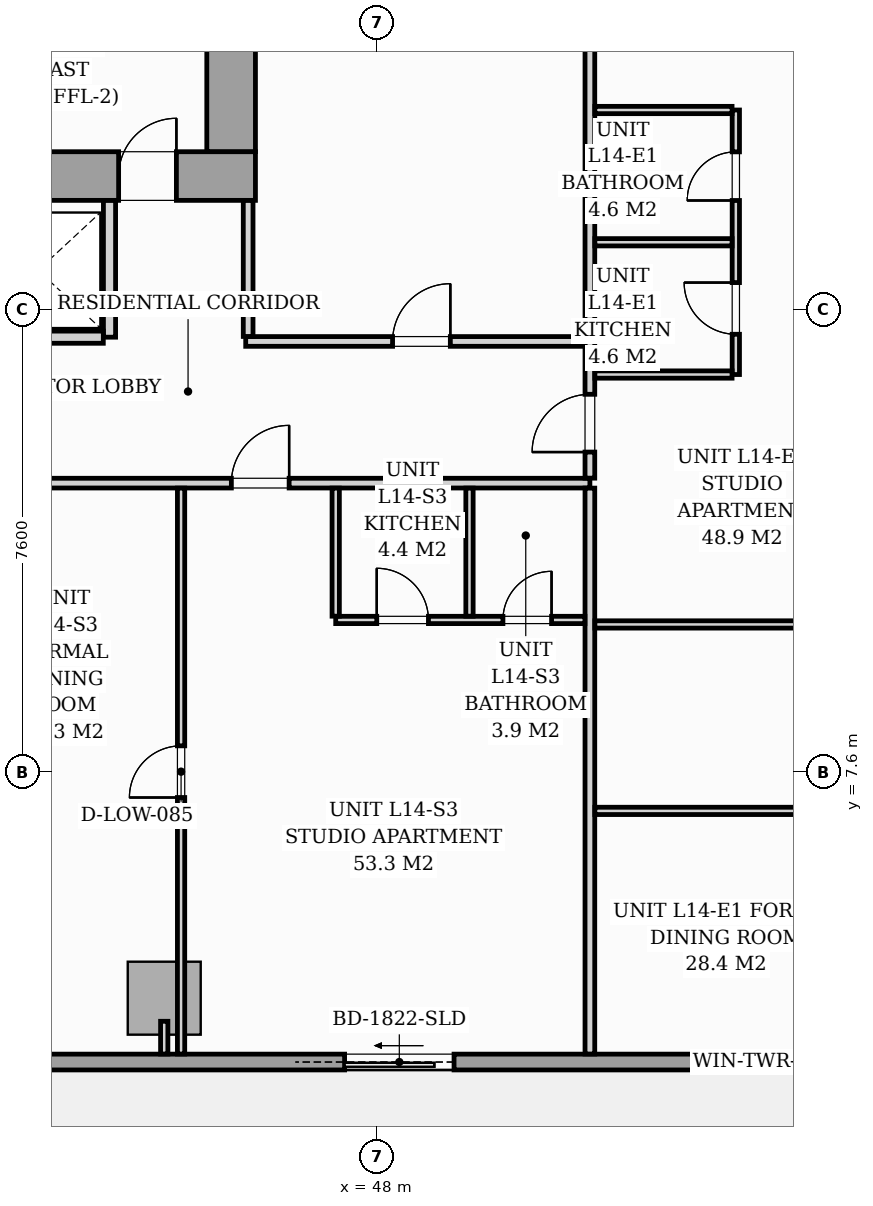
"""IFC4 building model, lengths in metres.
Left out: names, types, materials, properties, quantities, classifications, styles, units other than length and angle.
Written with IfcOpenShell. Run it as: python <this file> out.ifc"""

import sys

from ifc_helpers import new_model, si_unit, direction, frame, frame_2d, origin, origin_2d, place, context, subcontext, project, spatial, rectangle, i_section, extrude, source, transform, mapped, element, fill, save


model = new_model("IFC4")
c1 = context("Model", 3, precision=1e-05, world=origin(), true_north=direction((0.0, 1.0)))
c2 = subcontext(c1, "Body", "Model", "MODEL_VIEW")
j1 = project(units=[si_unit("LENGTHUNIT", "METRE"), si_unit("PLANEANGLEUNIT", "RADIAN")], contexts=[c1])
p1 = place(None, origin())
s1 = spatial("IfcSite", under=j1, at=p1, CompositionType="ELEMENT")
p2 = place(p1, origin())
s2 = spatial("IfcBuilding", under=s1, at=p2, CompositionType="ELEMENT")
p3 = place(p2, frame((0.0, 0.0, 51.8)))
s3 = spatial("IfcBuildingStorey", under=s2, at=p3, CompositionType="ELEMENT", Elevation=51.8)
m1 = source(origin(), c2, "Body", "SweptSolid", [
    extrude(i_section(OverallWidth=0.437, OverallDepth=0.514, WebThickness=0.061, FlangeThickness=0.097, FilletRadius=0.018, at=origin_2d()), origin(), (0.0, 0.0, 1.0), 3.196),
])
p4 = place(p3, frame((45.6, 17.4, 0.002), z_axis=(0.0, 0.0, 1.0), x_axis=(1.0, 0.0, 0.0)))
e1 = element("IfcColumn", 1, at=p4, inside=s3, PredefinedType="PILASTER", context=c2, shape_type="MappedRepresentation", body=[
    mapped(m1, transform((0.0, 0.0, 0.0), scale=1.0)),
])
m2 = source(origin(), c2, "Body", "SweptSolid", [
    extrude(rectangle(XDim=1.2, YDim=1.2, at=origin_2d()), origin(), (0.0, 0.0, 1.0), 3.196),
])
p5 = place(p3, frame((44.5, 3.88, 0.002), z_axis=(0.0, 0.0, 1.0), x_axis=(1.0, 0.0, 0.0)))
e2 = element("IfcColumn", 2, at=p5, inside=s3, PredefinedType="COLUMN", context=c2, shape_type="MappedRepresentation", body=[
    mapped(m2, transform((0.0, 0.0, 0.0), scale=1.0)),
])
p6 = place(p3, frame((57.3, 2.83, 0.0), z_axis=(0.0, 0.0, 1.0), x_axis=(-1.0, 0.0, 0.0)))
e3 = element("IfcWall", 3, at=p6, inside=s3, PredefinedType="STANDARD", context=c2, shape_type="SweptSolid", body=[
    extrude(rectangle(XDim=17.15, YDim=0.26, at=frame_2d((8.575, 0.0))), origin(), (0.0, 0.0, 1.0), 2.94),
])
p7 = place(p6, frame((8.034, 0.0, 0.0)))
e4 = element("IfcOpeningElement", 4, at=p7, cuts=e3, PredefinedType="OPENING", context=c2, shape_type="SweptSolid", body=[
    extrude(rectangle(XDim=1.8, YDim=2.06, at=frame_2d((0.9, 1.03))), frame((0.0, 0.14, 0.0), z_axis=(0.0, -1.0, 0.0), x_axis=(1.0, 0.0, 0.0)), (0.0, 0.0, 1.0), 0.28),
])
p8 = place(p6, frame((2.05, 0.0, 0.65)))
e5 = element("IfcOpeningElement", 5, at=p8, cuts=e3, PredefinedType="OPENING", context=c2, shape_type="SweptSolid", body=[
    extrude(rectangle(XDim=1.6, YDim=1.5, at=frame_2d((0.8, 0.75))), frame((0.0, 0.14, 0.0), z_axis=(0.0, -1.0, 0.0), x_axis=(1.0, 0.0, 0.0)), (0.0, 0.0, 1.0), 0.28),
])
p9 = place(p3, frame((26.0, 17.4, 0.0), z_axis=(0.0, 0.0, 1.0), x_axis=(1.0, 0.0, 0.0)))
e6 = element("IfcWall", 6, at=p9, inside=s3, PredefinedType="SHEAR", context=c2, shape_type="SweptSolid", body=[
    extrude(rectangle(XDim=20.0, YDim=0.8, at=frame_2d((10.0, 0.0))), origin(), (0.0, 0.0, 1.0), 3.2),
])
p10 = place(p9, frame((1.15, 0.0, 0.0)))
e7 = element("IfcOpeningElement", 7, at=p10, cuts=e6, PredefinedType="OPENING", context=c2, shape_type="SweptSolid", body=[
    extrude(rectangle(XDim=0.95, YDim=2.06, at=frame_2d((0.475, 1.03))), frame((0.0, 0.41, 0.0), z_axis=(0.0, -1.0, 0.0), x_axis=(1.0, 0.0, 0.0)), (0.0, 0.0, 1.0), 0.82),
])
p11 = place(p9, frame((9.58, 0.0, 0.0)))
e8 = element("IfcOpeningElement", 8, at=p11, cuts=e6, PredefinedType="OPENING", context=c2, shape_type="SweptSolid", body=[
    extrude(rectangle(XDim=0.85, YDim=2.0, at=frame_2d((0.425, 1.0))), frame((0.0, 0.41, 0.0), z_axis=(0.0, -1.0, 0.0), x_axis=(1.0, 0.0, 0.0)), (0.0, 0.0, 1.0), 0.82),
])
p12 = place(p9, frame((17.75, 0.0, 0.0)))
e9 = element("IfcOpeningElement", 9, at=p12, cuts=e6, PredefinedType="OPENING", context=c2, shape_type="SweptSolid", body=[
    extrude(rectangle(XDim=0.95, YDim=2.06, at=frame_2d((0.475, 1.03))), frame((0.0, 0.41, 0.0), z_axis=(0.0, -1.0, 0.0), x_axis=(1.0, 0.0, 0.0)), (0.0, 0.0, 1.0), 0.82),
])
p13 = place(p3, frame((45.6, 17.802, 0.0), z_axis=(0.0, 0.0, 1.0), x_axis=(0.0, 1.0, 0.0)))
e10 = element("IfcWall", 10, at=p13, inside=s3, PredefinedType="SHEAR", context=c2, shape_type="SweptSolid", body=[
    extrude(rectangle(XDim=5.796, YDim=0.8, at=frame_2d((2.898, 0.0))), origin(), (0.0, 0.0, 1.0), 3.2),
])
p14 = place(p3, frame((43.6, 14.75, 0.0), z_axis=(0.0, 0.0, 1.0), x_axis=(0.0, 1.0, 0.0)))
e11 = element("IfcWall", 11, at=p14, inside=s3, PredefinedType="PARTITIONING", context=c2, shape_type="SweptSolid", body=[
    extrude(rectangle(XDim=2.248, YDim=0.2, at=frame_2d((1.124, 0.0))), origin(), (0.0, 0.0, 1.0), 2.94),
])
p15 = place(p3, frame((41.352, 14.75, 0.0), z_axis=(0.0, 0.0, 1.0), x_axis=(1.0, 0.0, 0.0)))
e12 = element("IfcWall", 12, at=p15, inside=s3, PredefinedType="PARTITIONING", context=c2, shape_type="SweptSolid", body=[
    extrude(rectangle(XDim=2.146, YDim=0.2, at=frame_2d((1.073, 0.0))), origin(), (0.0, 0.0, 1.0), 2.94),
])
p16 = place(p3, frame((16.3, 12.35, 0.0), z_axis=(0.0, 0.0, 1.0), x_axis=(1.0, 0.0, 0.0)))
e13 = element("IfcWall", 13, at=p16, inside=s3, PredefinedType="PARTITIONING", context=c2, shape_type="SweptSolid", body=[
    extrude(rectangle(XDim=35.2, YDim=0.16, at=frame_2d((17.6, 0.0))), origin(), (0.0, 0.0, 1.0), 2.94),
])
p17 = place(p16, frame((6.307, 0.0, 0.0)))
e14 = element("IfcOpeningElement", 14, at=p17, cuts=e13, PredefinedType="OPENING", context=c2, shape_type="SweptSolid", body=[
    extrude(rectangle(XDim=0.95, YDim=2.06, at=frame_2d((0.475, 1.03))), frame((0.0, 0.09, 0.0), z_axis=(0.0, -1.0, 0.0), x_axis=(1.0, 0.0, 0.0)), (0.0, 0.0, 1.0), 0.18),
])
p18 = place(p16, frame((18.392, 0.0, 0.0)))
e15 = element("IfcOpeningElement", 15, at=p18, cuts=e13, PredefinedType="OPENING", context=c2, shape_type="SweptSolid", body=[
    extrude(rectangle(XDim=0.95, YDim=2.06, at=frame_2d((0.475, 1.03))), frame((0.0, 0.09, 0.0), z_axis=(0.0, -1.0, 0.0), x_axis=(1.0, 0.0, 0.0)), (0.0, 0.0, 1.0), 0.18),
])
p19 = place(p16, frame((29.304, 0.0, 0.0)))
e16 = element("IfcOpeningElement", 16, at=p19, cuts=e13, PredefinedType="OPENING", context=c2, shape_type="SweptSolid", body=[
    extrude(rectangle(XDim=0.95, YDim=2.06, at=frame_2d((0.475, 1.03))), frame((0.0, 0.09, 0.0), z_axis=(0.0, -1.0, 0.0), x_axis=(1.0, 0.0, 0.0)), (0.0, 0.0, 1.0), 0.18),
])
p20 = place(p3, frame((51.5, 2.962, 0.0), z_axis=(0.0, 0.0, 1.0), x_axis=(0.0, 1.0, 0.0)))
e17 = element("IfcWall", 17, at=p20, inside=s3, PredefinedType="PARTITIONING", context=c2, shape_type="SweptSolid", body=[
    extrude(rectangle(XDim=9.306, YDim=0.16, at=frame_2d((4.653, 0.0))), origin(), (0.0, 0.0, 1.0), 2.94),
])
p21 = place(p3, frame((51.5, 12.432, 0.0), z_axis=(0.0, 0.0, 1.0), x_axis=(0.0, 1.0, 0.0)))
e18 = element("IfcWall", 18, at=p21, inside=s3, PredefinedType="PARTITIONING", context=c2, shape_type="SweptSolid", body=[
    extrude(rectangle(XDim=15.006, YDim=0.16, at=frame_2d((7.503, 0.0))), origin(), (0.0, 0.0, 1.0), 2.94),
])
p22 = place(p21, frame((0.429, 0.0, 0.0)))
e19 = element("IfcOpeningElement", 19, at=p22, cuts=e18, PredefinedType="OPENING", context=c2, shape_type="SweptSolid", body=[
    extrude(rectangle(XDim=0.95, YDim=2.06, at=frame_2d((0.475, 1.03))), frame((0.0, 0.09, 0.0), z_axis=(0.0, -1.0, 0.0), x_axis=(1.0, 0.0, 0.0)), (0.0, 0.0, 1.0), 0.18),
])
p23 = place(p3, frame((47.32, 10.1, 0.0), z_axis=(0.0, 0.0, 1.0), x_axis=(1.0, 0.0, 0.0)))
e20 = element("IfcWall", 20, at=p23, inside=s3, PredefinedType="PARTITIONING", context=c2, shape_type="SweptSolid", body=[
    extrude(rectangle(XDim=4.098, YDim=0.12, at=frame_2d((2.049, 0.0))), origin(), (0.0, 0.0, 1.0), 2.94),
])
p24 = place(p23, frame((0.675, 0.0, 0.0)))
e21 = element("IfcOpeningElement", 21, at=p24, cuts=e20, PredefinedType="OPENING", context=c2, shape_type="SweptSolid", body=[
    extrude(rectangle(XDim=0.85, YDim=2.05, at=frame_2d((0.425, 1.025))), frame((0.0, 0.07, 0.0), z_axis=(0.0, -1.0, 0.0), x_axis=(1.0, 0.0, 0.0)), (0.0, 0.0, 1.0), 0.14),
])
p25 = place(p23, frame((2.75, 0.0, 0.0)))
e22 = element("IfcOpeningElement", 22, at=p25, cuts=e20, PredefinedType="OPENING", context=c2, shape_type="SweptSolid", body=[
    extrude(rectangle(XDim=0.8, YDim=2.02, at=frame_2d((0.4, 1.01))), frame((0.0, 0.07, 0.0), z_axis=(0.0, -1.0, 0.0), x_axis=(1.0, 0.0, 0.0)), (0.0, 0.0, 1.0), 0.14),
])
for number, where, z_axis, x_axis in (
    (23, (47.32, 10.162, 0.0), (0.0, 0.0, 1.0), (0.0, 1.0, 0.0)),
    (24, (49.52, 10.162, 0.0), (0.0, 0.0, 1.0), (0.0, 1.0, 0.0)),
):
    element("IfcWall", number, at=place(p3, frame(where, z_axis=z_axis, x_axis=x_axis)), inside=s3, PredefinedType="PARTITIONING", context=c2, shape_type="SweptSolid", body=[
        extrude(rectangle(XDim=2.106, YDim=0.12, at=frame_2d((1.053, 0.0))), origin(), (0.0, 0.0, 1.0), 2.94),
    ])
p26 = place(p3, frame((44.777, 2.962, 0.0), z_axis=(0.0, 0.0, 1.0), x_axis=(0.0, 1.0, 0.0)))
e25 = element("IfcWall", 25, at=p26, inside=s3, PredefinedType="PARTITIONING", context=c2, shape_type="SweptSolid", body=[
    extrude(rectangle(XDim=9.306, YDim=0.12, at=frame_2d((4.653, 0.0))), origin(), (0.0, 0.0, 1.0), 2.136),
])
p27 = place(p26, frame((4.218, 0.0, 0.0)))
e26 = element("IfcOpeningElement", 26, at=p27, cuts=e25, PredefinedType="OPENING", context=c2, shape_type="SweptSolid", body=[
    extrude(rectangle(XDim=0.85, YDim=2.01, at=frame_2d((0.425, 1.005))), frame((0.0, 0.07, 0.0), z_axis=(0.0, -1.0, 0.0), x_axis=(1.0, 0.0, 0.0)), (0.0, 0.0, 1.0), 0.14),
])
p28 = place(p3, frame((53.9, 14.136, 0.0), z_axis=(0.0, 0.0, 1.0), x_axis=(0.0, 1.0, 0.0)))
e27 = element("IfcWall", 27, at=p28, inside=s3, PredefinedType="PARTITIONING", context=c2, shape_type="SweptSolid", body=[
    extrude(rectangle(XDim=4.35, YDim=0.12, at=frame_2d((2.175, 0.0))), origin(), (0.0, 0.0, 1.0), 2.94),
])
p29 = place(p28, frame((0.662, 0.0, 0.0)))
e28 = element("IfcOpeningElement", 28, at=p29, cuts=e27, PredefinedType="OPENING", context=c2, shape_type="SweptSolid", body=[
    extrude(rectangle(XDim=0.85, YDim=2.05, at=frame_2d((0.425, 1.025))), frame((0.0, 0.07, 0.0), z_axis=(0.0, -1.0, 0.0), x_axis=(1.0, 0.0, 0.0)), (0.0, 0.0, 1.0), 0.14),
])
p30 = place(p28, frame((2.862, 0.0, 0.0)))
e29 = element("IfcOpeningElement", 29, at=p30, cuts=e27, PredefinedType="OPENING", context=c2, shape_type="SweptSolid", body=[
    extrude(rectangle(XDim=0.8, YDim=2.02, at=frame_2d((0.4, 1.01))), frame((0.0, 0.07, 0.0), z_axis=(0.0, -1.0, 0.0), x_axis=(1.0, 0.0, 0.0)), (0.0, 0.0, 1.0), 0.14),
])
p31 = place(p3, frame((51.582, 16.311, 0.0), z_axis=(0.0, 0.0, 1.0), x_axis=(1.0, 0.0, 0.0)))
e30 = element("IfcWall", 30, at=p31, inside=s3, PredefinedType="PARTITIONING", context=c2, shape_type="SweptSolid", body=[
    extrude(rectangle(XDim=2.256, YDim=0.12, at=frame_2d((1.128, 0.0))), origin(), (0.0, 0.0, 1.0), 2.045),
])
for number, where, z_axis, x_axis in (
    (31, (51.582, 14.136, 0.0), (0.0, 0.0, 1.0), (1.0, 0.0, 0.0)),
    (32, (51.582, 18.486, 0.0), (0.0, 0.0, 1.0), (1.0, 0.0, 0.0)),
):
    element("IfcWall", number, at=place(p3, frame(where, z_axis=z_axis, x_axis=x_axis)), inside=s3, PredefinedType="PARTITIONING", context=c2, shape_type="SweptSolid", body=[
        extrude(rectangle(XDim=2.256, YDim=0.12, at=frame_2d((1.128, 0.0))), origin(), (0.0, 0.0, 1.0), 2.94),
    ])
p32 = place(p3, frame((51.582, 6.96, 0.0), z_axis=(0.0, 0.0, 1.0), x_axis=(1.0, 0.0, 0.0)))
e33 = element("IfcWall", 33, at=p32, inside=s3, PredefinedType="PARTITIONING", context=c2, shape_type="SweptSolid", body=[
    extrude(rectangle(XDim=8.138, YDim=0.12, at=frame_2d((4.069, 0.0))), origin(), (0.0, 0.0, 1.0), 2.94),
])
p33 = place(p32, frame((3.653, 0.0, 0.0)))
e34 = element("IfcOpeningElement", 34, at=p33, cuts=e33, PredefinedType="OPENING", context=c2, shape_type="SweptSolid", body=[
    extrude(rectangle(XDim=0.85, YDim=2.05, at=frame_2d((0.425, 1.025))), frame((0.0, 0.07, 0.0), z_axis=(0.0, -1.0, 0.0), x_axis=(1.0, 0.0, 0.0)), (0.0, 0.0, 1.0), 0.14),
])
p34 = place(p3, frame((51.582, 10.026, 0.0), z_axis=(0.0, 0.0, 1.0), x_axis=(1.0, 0.0, 0.0)))
e35 = element("IfcWall", 35, at=p34, inside=s3, PredefinedType="PARTITIONING", context=c2, shape_type="SweptSolid", body=[
    extrude(rectangle(XDim=8.138, YDim=0.12, at=frame_2d((4.069, 0.0))), origin(), (0.0, 0.0, 1.0), 2.94),
])
p35 = place(p34, frame((3.653, 0.0, 0.0)))
e36 = element("IfcOpeningElement", 36, at=p35, cuts=e35, PredefinedType="OPENING", context=c2, shape_type="SweptSolid", body=[
    extrude(rectangle(XDim=0.85, YDim=2.05, at=frame_2d((0.425, 1.025))), frame((0.0, 0.07, 0.0), z_axis=(0.0, -1.0, 0.0), x_axis=(1.0, 0.0, 0.0)), (0.0, 0.0, 1.0), 0.14),
])
p36 = place(p3, frame((45.84, 14.68, 0.0), z_axis=(0.0, 0.0, 1.0), x_axis=(1.0, 0.0, 0.0)))
e37 = element("IfcWall", 37, at=p36, inside=s3, PredefinedType="PARTITIONING", context=c2, shape_type="SweptSolid", body=[
    extrude(rectangle(XDim=5.578, YDim=0.16, at=frame_2d((2.789, 0.0))), origin(), (0.0, 0.0, 1.0), 2.94),
])
p37 = place(p36, frame((2.415, 0.0, 0.0)))
e38 = element("IfcOpeningElement", 38, at=p37, cuts=e37, PredefinedType="OPENING", context=c2, shape_type="SweptSolid", body=[
    extrude(rectangle(XDim=0.95, YDim=2.06, at=frame_2d((0.475, 1.03))), frame((0.0, 0.09, 0.0), z_axis=(0.0, -1.0, 0.0), x_axis=(1.0, 0.0, 0.0)), (0.0, 0.0, 1.0), 0.18),
])
p38 = place(p3, frame((45.88, 14.762, 0.0), z_axis=(0.0, 0.0, 1.0), x_axis=(0.0, 1.0, 0.0)))
e39 = element("IfcWall", 39, at=p38, inside=s3, PredefinedType="PARTITIONING", context=c2, shape_type="SweptSolid", body=[
    extrude(rectangle(XDim=2.236, YDim=0.16, at=frame_2d((1.118, 0.0))), origin(), (0.0, 0.0, 1.0), 2.94),
])
p39 = place(p3, frame((44.5, 3.5, 0.0), z_axis=(0.0, 0.0, 1.0), x_axis=(0.0, -1.0, 0.0)))
e40 = element("IfcWall", 40, at=p39, inside=s3, PredefinedType="PARTITIONING", context=c2, shape_type="SweptSolid", body=[
    extrude(rectangle(XDim=0.538, YDim=0.12, at=frame_2d((0.269, 0.0))), origin(), (0.0, 0.0, 1.0), 2.94),
])
m3 = source(origin(), c2, "Body", "SweptSolid", [
    extrude(rectangle(XDim=1.8, YDim=2.06, at=frame_2d((0.9, 1.03))), frame((0.0, 0.025, 0.0), z_axis=(0.0, -1.0, 0.0), x_axis=(1.0, 0.0, 0.0)), (0.0, 0.0, 1.0), 0.05),
])
p40 = place(p7, origin())
e41 = element("IfcDoor", 41, at=p40, inside=s3, OperationType="SLIDING_TO_RIGHT", PredefinedType="DOOR", context=c2, shape_type="MappedRepresentation", body=[
    mapped(m3, transform((0.0, 0.0, 0.0), scale=1.0)),
])
fill(e4, e41)
m4 = source(origin(), c2, "Body", "SweptSolid", [
    extrude(rectangle(XDim=1.6, YDim=1.5, at=frame_2d((0.8, 0.75))), frame((0.0, 0.03, 0.0), z_axis=(0.0, -1.0, 0.0), x_axis=(1.0, 0.0, 0.0)), (0.0, 0.0, 1.0), 0.06),
])
p41 = place(p8, origin())
e42 = element("IfcWindow", 42, at=p41, inside=s3, PartitioningType="SINGLE_PANEL", PredefinedType="WINDOW", context=c2, shape_type="MappedRepresentation", body=[
    mapped(m4, transform((0.0, 0.0, 0.0), scale=1.0)),
])
fill(e5, e42)
m5 = source(origin(), c2, "Body", "SweptSolid", [
    extrude(rectangle(XDim=0.95, YDim=2.06, at=frame_2d((0.475, 1.03))), frame((0.0, 0.025, 0.0), z_axis=(0.0, -1.0, 0.0), x_axis=(1.0, 0.0, 0.0)), (0.0, 0.0, 1.0), 0.05),
])
p42 = place(p12, origin())
e43 = element("IfcDoor", 43, at=p42, inside=s3, OperationType="SINGLE_SWING_RIGHT", PredefinedType="DOOR", context=c2, shape_type="MappedRepresentation", body=[
    mapped(m5, transform((0.0, 0.0, 0.0), scale=1.0)),
])
fill(e9, e43)
m6 = source(origin(), c2, "Body", "SweptSolid", [
    extrude(rectangle(XDim=0.85, YDim=2.01, at=frame_2d((0.425, 1.005))), frame((0.0, 0.025, 0.0), z_axis=(0.0, -1.0, 0.0), x_axis=(1.0, 0.0, 0.0)), (0.0, 0.0, 1.0), 0.05),
])
p43 = place(p27, origin())
e44 = element("IfcDoor", 44, at=p43, inside=s3, OperationType="SINGLE_SWING_LEFT", PredefinedType="DOOR", context=c2, shape_type="MappedRepresentation", body=[
    mapped(m6, transform((0.0, 0.0, 0.0), scale=1.0)),
])
fill(e26, e44)
m7 = source(origin(), c2, "Body", "SweptSolid", [
    extrude(rectangle(XDim=0.95, YDim=2.06, at=frame_2d((0.475, 1.03))), frame((0.0, 0.025, 0.0), z_axis=(0.0, -1.0, 0.0), x_axis=(1.0, 0.0, 0.0)), (0.0, 0.0, 1.0), 0.05),
])
p44 = place(p19, origin())
e45 = element("IfcDoor", 45, at=p44, inside=s3, OperationType="SINGLE_SWING_RIGHT", PredefinedType="DOOR", context=c2, shape_type="MappedRepresentation", body=[
    mapped(m7, transform((0.0, 0.0, 0.0), scale=1.0)),
])
fill(e16, e45)
m8 = source(origin(), c2, "Body", "SweptSolid", [
    extrude(rectangle(XDim=0.85, YDim=2.05, at=frame_2d((0.425, 1.025))), frame((0.0, 0.025, 0.0), z_axis=(0.0, -1.0, 0.0), x_axis=(1.0, 0.0, 0.0)), (0.0, 0.0, 1.0), 0.05),
])
p45 = place(p24, origin())
e46 = element("IfcDoor", 46, at=p45, inside=s3, OperationType="SINGLE_SWING_LEFT", PredefinedType="DOOR", context=c2, shape_type="MappedRepresentation", body=[
    mapped(m8, transform((0.0, 0.0, 0.0), scale=1.0)),
])
fill(e21, e46)
m9 = source(origin(), c2, "Body", "SweptSolid", [
    extrude(rectangle(XDim=0.8, YDim=2.02, at=frame_2d((0.4, 1.01))), frame((0.0, 0.025, 0.0), z_axis=(0.0, -1.0, 0.0), x_axis=(1.0, 0.0, 0.0)), (0.0, 0.0, 1.0), 0.05),
])
p46 = place(p25, origin())
e47 = element("IfcDoor", 47, at=p46, inside=s3, OperationType="SINGLE_SWING_RIGHT", PredefinedType="DOOR", context=c2, shape_type="MappedRepresentation", body=[
    mapped(m9, transform((0.0, 0.0, 0.0), scale=1.0)),
])
fill(e22, e47)
p47 = place(p22, origin())
e48 = element("IfcDoor", 48, at=p47, inside=s3, OperationType="SINGLE_SWING_LEFT", PredefinedType="DOOR", context=c2, shape_type="MappedRepresentation", body=[
    mapped(m7, transform((0.0, 0.0, 0.0), scale=1.0)),
])
fill(e19, e48)
p48 = place(p29, origin())
e49 = element("IfcDoor", 49, at=p48, inside=s3, OperationType="SINGLE_SWING_RIGHT", PredefinedType="DOOR", context=c2, shape_type="MappedRepresentation", body=[
    mapped(m8, transform((0.0, 0.0, 0.0), scale=1.0)),
])
fill(e28, e49)
p49 = place(p30, origin())
e50 = element("IfcDoor", 50, at=p49, inside=s3, OperationType="SINGLE_SWING_LEFT", PredefinedType="DOOR", context=c2, shape_type="MappedRepresentation", body=[
    mapped(m9, transform((0.0, 0.0, 0.0), scale=1.0)),
])
fill(e29, e50)
p50 = place(p37, origin())
e51 = element("IfcDoor", 51, at=p50, inside=s3, OperationType="SINGLE_SWING_RIGHT", PredefinedType="DOOR", context=c2, shape_type="MappedRepresentation", body=[
    mapped(m7, transform((0.0, 0.0, 0.0), scale=1.0)),
])
fill(e38, e51)
save(model, sys.argv[1])
